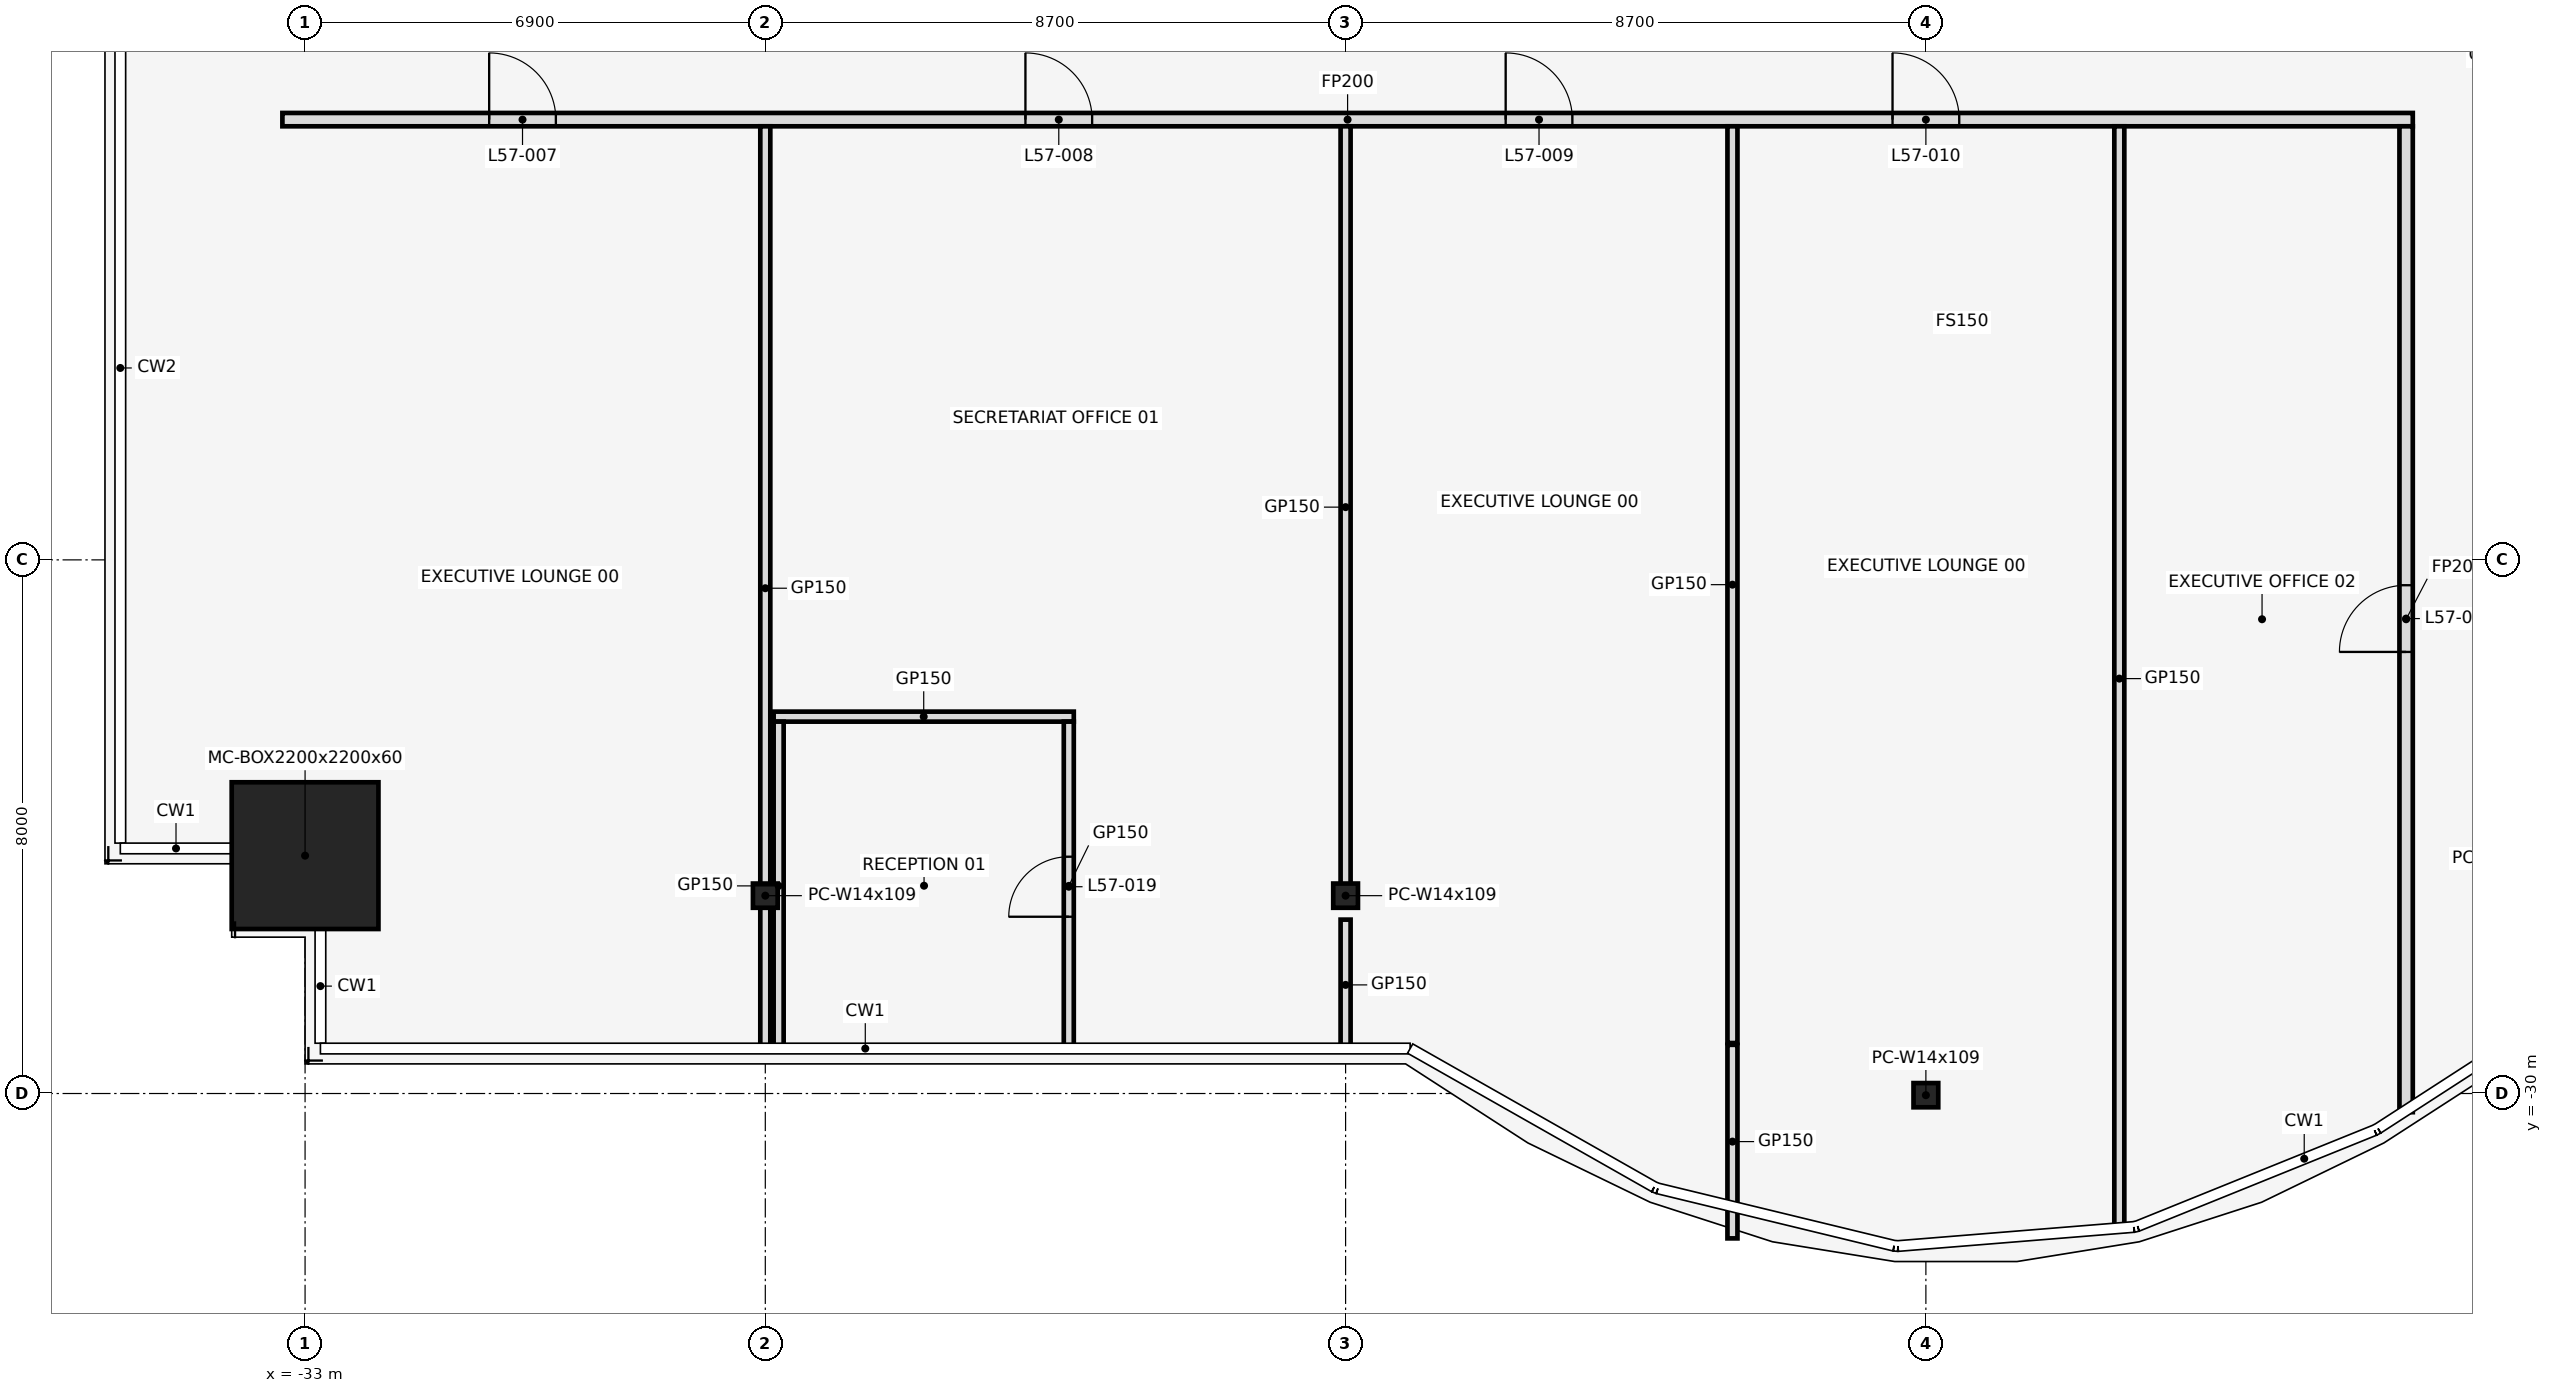
"""IFC4 building model, lengths in metres.
Left out: names, types, materials, properties, quantities, classifications, styles, units other than length and angle.
Written with IfcOpenShell. Run it as: python <this file> out.ifc"""

import sys

from ifc_helpers import new_model, si_unit, direction, frame, frame_2d, origin, origin_2d, place, context, subcontext, project, spatial, rectangle, hollow_rectangle, i_section, extrude, element, fill, save


model = new_model("IFC4")
c1 = context("Model", 3, precision=1e-05, world=origin(), true_north=direction((0.0, 1.0)))
c2 = subcontext(c1, "Body", "Model", "MODEL_VIEW")
j1 = project(units=[si_unit("LENGTHUNIT", "METRE"), si_unit("PLANEANGLEUNIT", "RADIAN")], contexts=[c1])
p1 = place(None, origin())
s1 = spatial("IfcSite", under=j1, at=p1, CompositionType="ELEMENT")
p2 = place(p1, origin())
s2 = spatial("IfcBuilding", under=s1, at=p2, CompositionType="ELEMENT")
p3 = place(p2, frame((0.0, 0.0, 254.0)))
s3 = spatial("IfcBuildingStorey", under=s2, at=p3, CompositionType="ELEMENT", Elevation=254.0)
p4 = place(p3, frame((-33.0, -26.434, 0.0), z_axis=(0.0, 0.0, 1.0), x_axis=(1.0, 0.0, 0.0)))
e1 = element("IfcColumn", 1, at=p4, inside=s3, PredefinedType="COLUMN", context=c2, shape_type="SweptSolid", body=[
    extrude(hollow_rectangle(XDim=2.2, YDim=2.2, WallThickness=0.06, at=origin_2d()), origin(), (0.0, 0.0, 1.0), 4.2),
])
for number, where, z_axis, x_axis in (
    (2, (-26.1, -27.034, 0.0), (0.0, 0.0, 1.0), (1.0, 0.0, 0.0)),
    (3, (-17.4, -27.034, 0.0), (0.0, 0.0, 1.0), (1.0, 0.0, 0.0)),
    (4, (-8.7, -30.025, 0.0), (0.0, 0.0, 1.0), (1.0, 0.0, 0.0)),
):
    element("IfcColumn", number, at=place(p3, frame(where, z_axis=z_axis, x_axis=x_axis)), inside=s3, PredefinedType="COLUMN", context=c2, shape_type="SweptSolid", body=[
        extrude(i_section(OverallWidth=0.371, OverallDepth=0.363, WebThickness=0.013, FlangeThickness=0.022, at=origin_2d()), origin(), (0.0, 0.0, 1.0), 4.2),
    ])
p5 = place(p3, frame((-25.975, -24.35, 0.0), z_axis=(0.0, 0.0, 1.0), x_axis=(1.0, 0.0, 0.0)))
e5 = element("IfcWall", 5, at=p5, inside=s3, PredefinedType="PARTITIONING", context=c2, shape_type="SweptSolid", body=[
    extrude(rectangle(XDim=4.5, YDim=0.15, at=frame_2d((2.25, 0.0))), origin(), (0.0, 0.0, 1.0), 3.118),
])
p6 = place(p3, frame((-33.34, -15.4, 0.0), z_axis=(0.0, 0.0, 1.0), x_axis=(1.0, 0.0, 0.0)))
e6 = element("IfcWall", 6, at=p6, inside=s3, PredefinedType="PARTITIONING", context=c2, shape_type="SweptSolid", body=[
    extrude(rectangle(XDim=31.94, YDim=0.2, at=frame_2d((15.97, 0.0))), origin(), (0.0, 0.0, 1.0), 3.118),
])
p7 = place(p6, frame((3.1, 0.0, 0.0)))
e7 = element("IfcOpeningElement", 7, at=p7, cuts=e6, PredefinedType="OPENING", context=c2, shape_type="SweptSolid", body=[
    extrude(rectangle(XDim=1.0, YDim=2.1, at=frame_2d((0.5, 1.05))), frame((0.0, 0.112, 0.0), z_axis=(0.0, -1.0, 0.0), x_axis=(1.0, 0.0, 0.0)), (0.0, 0.0, 1.0), 0.224),
])
p8 = place(p6, frame((11.14, 0.0, 0.0)))
e8 = element("IfcOpeningElement", 8, at=p8, cuts=e6, PredefinedType="OPENING", context=c2, shape_type="SweptSolid", body=[
    extrude(rectangle(XDim=1.0, YDim=2.1, at=frame_2d((0.5, 1.05))), frame((0.0, 0.112, 0.0), z_axis=(0.0, -1.0, 0.0), x_axis=(1.0, 0.0, 0.0)), (0.0, 0.0, 1.0), 0.224),
])
p9 = place(p6, frame((18.34, 0.0, 0.0)))
e9 = element("IfcOpeningElement", 9, at=p9, cuts=e6, PredefinedType="OPENING", context=c2, shape_type="SweptSolid", body=[
    extrude(rectangle(XDim=1.0, YDim=2.1, at=frame_2d((0.5, 1.05))), frame((0.0, 0.112, 0.0), z_axis=(0.0, -1.0, 0.0), x_axis=(1.0, 0.0, 0.0)), (0.0, 0.0, 1.0), 0.224),
])
p10 = place(p6, frame((24.14, 0.0, 0.0)))
e10 = element("IfcOpeningElement", 10, at=p10, cuts=e6, PredefinedType="OPENING", context=c2, shape_type="SweptSolid", body=[
    extrude(rectangle(XDim=1.0, YDim=2.1, at=frame_2d((0.5, 1.05))), frame((0.0, 0.112, 0.0), z_axis=(0.0, -1.0, 0.0), x_axis=(1.0, 0.0, 0.0)), (0.0, 0.0, 1.0), 0.224),
])
p11 = place(p3, frame((-26.1, -29.35, 0.0), z_axis=(0.0, 0.0, 1.0), x_axis=(0.0, 1.0, 0.0)))
e11 = element("IfcWall", 11, at=p11, inside=s3, PredefinedType="PARTITIONING", context=c2, shape_type="SweptSolid", body=[
    extrude(rectangle(XDim=13.85, YDim=0.15, at=frame_2d((6.925, 0.0))), origin(), (0.0, 0.0, 1.0), 3.118),
])
p12 = place(p3, frame((-25.9, -29.35, 0.0), z_axis=(0.0, 0.0, 1.0), x_axis=(0.0, 1.0, 0.0)))
e12 = element("IfcWall", 12, at=p12, inside=s3, PredefinedType="PARTITIONING", context=c2, shape_type="SweptSolid", body=[
    extrude(rectangle(XDim=4.925, YDim=0.15, at=frame_2d((2.462, 0.0))), origin(), (0.0, 0.0, 1.0), 3.118),
])
p13 = place(p3, frame((-21.55, -29.35, 0.0), z_axis=(0.0, 0.0, 1.0), x_axis=(0.0, 1.0, 0.0)))
e13 = element("IfcWall", 13, at=p13, inside=s3, PredefinedType="PARTITIONING", context=c2, shape_type="SweptSolid", body=[
    extrude(rectangle(XDim=4.925, YDim=0.15, at=frame_2d((2.462, 0.0))), origin(), (0.0, 0.0, 1.0), 3.118),
])
p14 = place(p13, frame((2.0, 0.0, 0.0)))
e14 = element("IfcOpeningElement", 14, at=p14, cuts=e13, PredefinedType="OPENING", context=c2, shape_type="SweptSolid", body=[
    extrude(rectangle(XDim=0.9, YDim=2.1, at=frame_2d((0.45, 1.05))), frame((0.0, 0.087, 0.0), z_axis=(0.0, -1.0, 0.0), x_axis=(1.0, 0.0, 0.0)), (0.0, 0.0, 1.0), 0.174),
])
p15 = place(p3, frame((-17.4, -29.35, 0.0), z_axis=(0.0, 0.0, 1.0), x_axis=(0.0, 1.0, 0.0)))
e15 = element("IfcWall", 15, at=p15, inside=s3, PredefinedType="PARTITIONING", context=c2, shape_type="SweptSolid", body=[
    extrude(rectangle(XDim=1.957, YDim=0.15, at=frame_2d((0.979, 0.0))), origin(), (0.0, 0.0, 1.0), 3.118),
])
p16 = place(p3, frame((-17.4, -26.919, 0.0), z_axis=(0.0, 0.0, 1.0), x_axis=(0.0, 1.0, 0.0)))
e16 = element("IfcWall", 16, at=p16, inside=s3, PredefinedType="PARTITIONING", context=c2, shape_type="SweptSolid", body=[
    extrude(rectangle(XDim=11.419, YDim=0.15, at=frame_2d((5.709, 0.0))), origin(), (0.0, 0.0, 1.0), 3.118),
])
p17 = place(p3, frame((-11.6, -32.172, 0.0), z_axis=(0.0, 0.0, 1.0), x_axis=(0.0, 1.0, 0.0)))
e17 = element("IfcWall", 17, at=p17, inside=s3, PredefinedType="PARTITIONING", context=c2, shape_type="SweptSolid", body=[
    extrude(rectangle(XDim=2.902, YDim=0.15, at=frame_2d((1.451, 0.0))), origin(), (0.0, 0.0, 1.0), 3.118),
])
p18 = place(p3, frame((-11.6, -29.243, 0.0), z_axis=(0.0, 0.0, 1.0), x_axis=(0.0, 1.0, 0.0)))
e18 = element("IfcWall", 18, at=p18, inside=s3, PredefinedType="PARTITIONING", context=c2, shape_type="SweptSolid", body=[
    extrude(rectangle(XDim=13.743, YDim=0.15, at=frame_2d((6.872, 0.0))), origin(), (0.0, 0.0, 1.0), 3.118),
])
p19 = place(p3, frame((-5.8, -32.06, 0.0), z_axis=(0.0, 0.0, 1.0), x_axis=(0.0, 1.0, 0.0)))
e19 = element("IfcWall", 19, at=p19, inside=s3, PredefinedType="PARTITIONING", context=c2, shape_type="SweptSolid", body=[
    extrude(rectangle(XDim=16.56, YDim=0.15, at=frame_2d((8.28, 0.0))), origin(), (0.0, 0.0, 1.0), 3.118),
])
p20 = place(p3, frame((-1.5, -30.28, 0.0), z_axis=(0.0, 0.0, 1.0), x_axis=(0.0, 1.0, 0.0)))
e20 = element("IfcWall", 20, at=p20, inside=s3, PredefinedType="PARTITIONING", context=c2, shape_type="SweptSolid", body=[
    extrude(rectangle(XDim=14.78, YDim=0.2, at=frame_2d((7.39, 0.0))), origin(), (0.0, 0.0, 1.0), 3.118),
])
p21 = place(p20, frame((6.9, 0.0, 0.0)))
e21 = element("IfcOpeningElement", 21, at=p21, cuts=e20, PredefinedType="OPENING", context=c2, shape_type="SweptSolid", body=[
    extrude(rectangle(XDim=1.0, YDim=2.1, at=frame_2d((0.5, 1.05))), frame((0.0, 0.112, 0.0), z_axis=(0.0, -1.0, 0.0), x_axis=(1.0, 0.0, 0.0)), (0.0, 0.0, 1.0), 0.224),
])
p22 = place(p7, frame((1.0, 0.0, 0.0), z_axis=(0.0, 0.0, 1.0), x_axis=(-1.0, 0.0, 0.0)))
e22 = element("IfcDoor", 22, at=p22, inside=s3, OperationType="SINGLE_SWING_LEFT", PredefinedType="DOOR", context=c2, shape_type="SweptSolid", body=[
    extrude(rectangle(XDim=1.0, YDim=2.1, at=frame_2d((0.5, 1.05))), frame((0.0, 0.025, 0.0), z_axis=(0.0, -1.0, 0.0), x_axis=(1.0, 0.0, 0.0)), (0.0, 0.0, 1.0), 0.05),
])
fill(e7, e22)
p23 = place(p8, frame((1.0, 0.0, 0.0), z_axis=(0.0, 0.0, 1.0), x_axis=(-1.0, 0.0, 0.0)))
e23 = element("IfcDoor", 23, at=p23, inside=s3, OperationType="SINGLE_SWING_RIGHT", PredefinedType="DOOR", context=c2, shape_type="SweptSolid", body=[
    extrude(rectangle(XDim=1.0, YDim=2.1, at=frame_2d((0.5, 1.05))), frame((0.0, 0.025, 0.0), z_axis=(0.0, -1.0, 0.0), x_axis=(1.0, 0.0, 0.0)), (0.0, 0.0, 1.0), 0.05),
])
fill(e8, e23)
p24 = place(p9, frame((1.0, 0.0, 0.0), z_axis=(0.0, 0.0, 1.0), x_axis=(-1.0, 0.0, 0.0)))
e24 = element("IfcDoor", 24, at=p24, inside=s3, OperationType="SINGLE_SWING_RIGHT", PredefinedType="DOOR", context=c2, shape_type="SweptSolid", body=[
    extrude(rectangle(XDim=1.0, YDim=2.1, at=frame_2d((0.5, 1.05))), frame((0.0, 0.025, 0.0), z_axis=(0.0, -1.0, 0.0), x_axis=(1.0, 0.0, 0.0)), (0.0, 0.0, 1.0), 0.05),
])
fill(e9, e24)
p25 = place(p10, frame((1.0, 0.0, 0.0), z_axis=(0.0, 0.0, 1.0), x_axis=(-1.0, 0.0, 0.0)))
e25 = element("IfcDoor", 25, at=p25, inside=s3, OperationType="SINGLE_SWING_LEFT", PredefinedType="DOOR", context=c2, shape_type="SweptSolid", body=[
    extrude(rectangle(XDim=1.0, YDim=2.1, at=frame_2d((0.5, 1.05))), frame((0.0, 0.025, 0.0), z_axis=(0.0, -1.0, 0.0), x_axis=(1.0, 0.0, 0.0)), (0.0, 0.0, 1.0), 0.05),
])
fill(e10, e25)
p26 = place(p21, origin())
e26 = element("IfcDoor", 26, at=p26, inside=s3, OperationType="SINGLE_SWING_LEFT", PredefinedType="DOOR", context=c2, shape_type="SweptSolid", body=[
    extrude(rectangle(XDim=1.0, YDim=2.1, at=frame_2d((0.5, 1.05))), frame((0.0, 0.025, 0.0), z_axis=(0.0, -1.0, 0.0), x_axis=(1.0, 0.0, 0.0)), (0.0, 0.0, 1.0), 0.05),
])
fill(e21, e26)
p27 = place(p14, origin())
e27 = element("IfcDoor", 27, at=p27, inside=s3, OperationType="SINGLE_SWING_LEFT", PredefinedType="DOOR", context=c2, shape_type="SweptSolid", body=[
    extrude(rectangle(XDim=0.9, YDim=2.1, at=frame_2d((0.45, 1.05))), frame((0.0, 0.025, 0.0), z_axis=(0.0, -1.0, 0.0), x_axis=(1.0, 0.0, 0.0)), (0.0, 0.0, 1.0), 0.05),
])
fill(e14, e27)
save(model, sys.argv[1])
